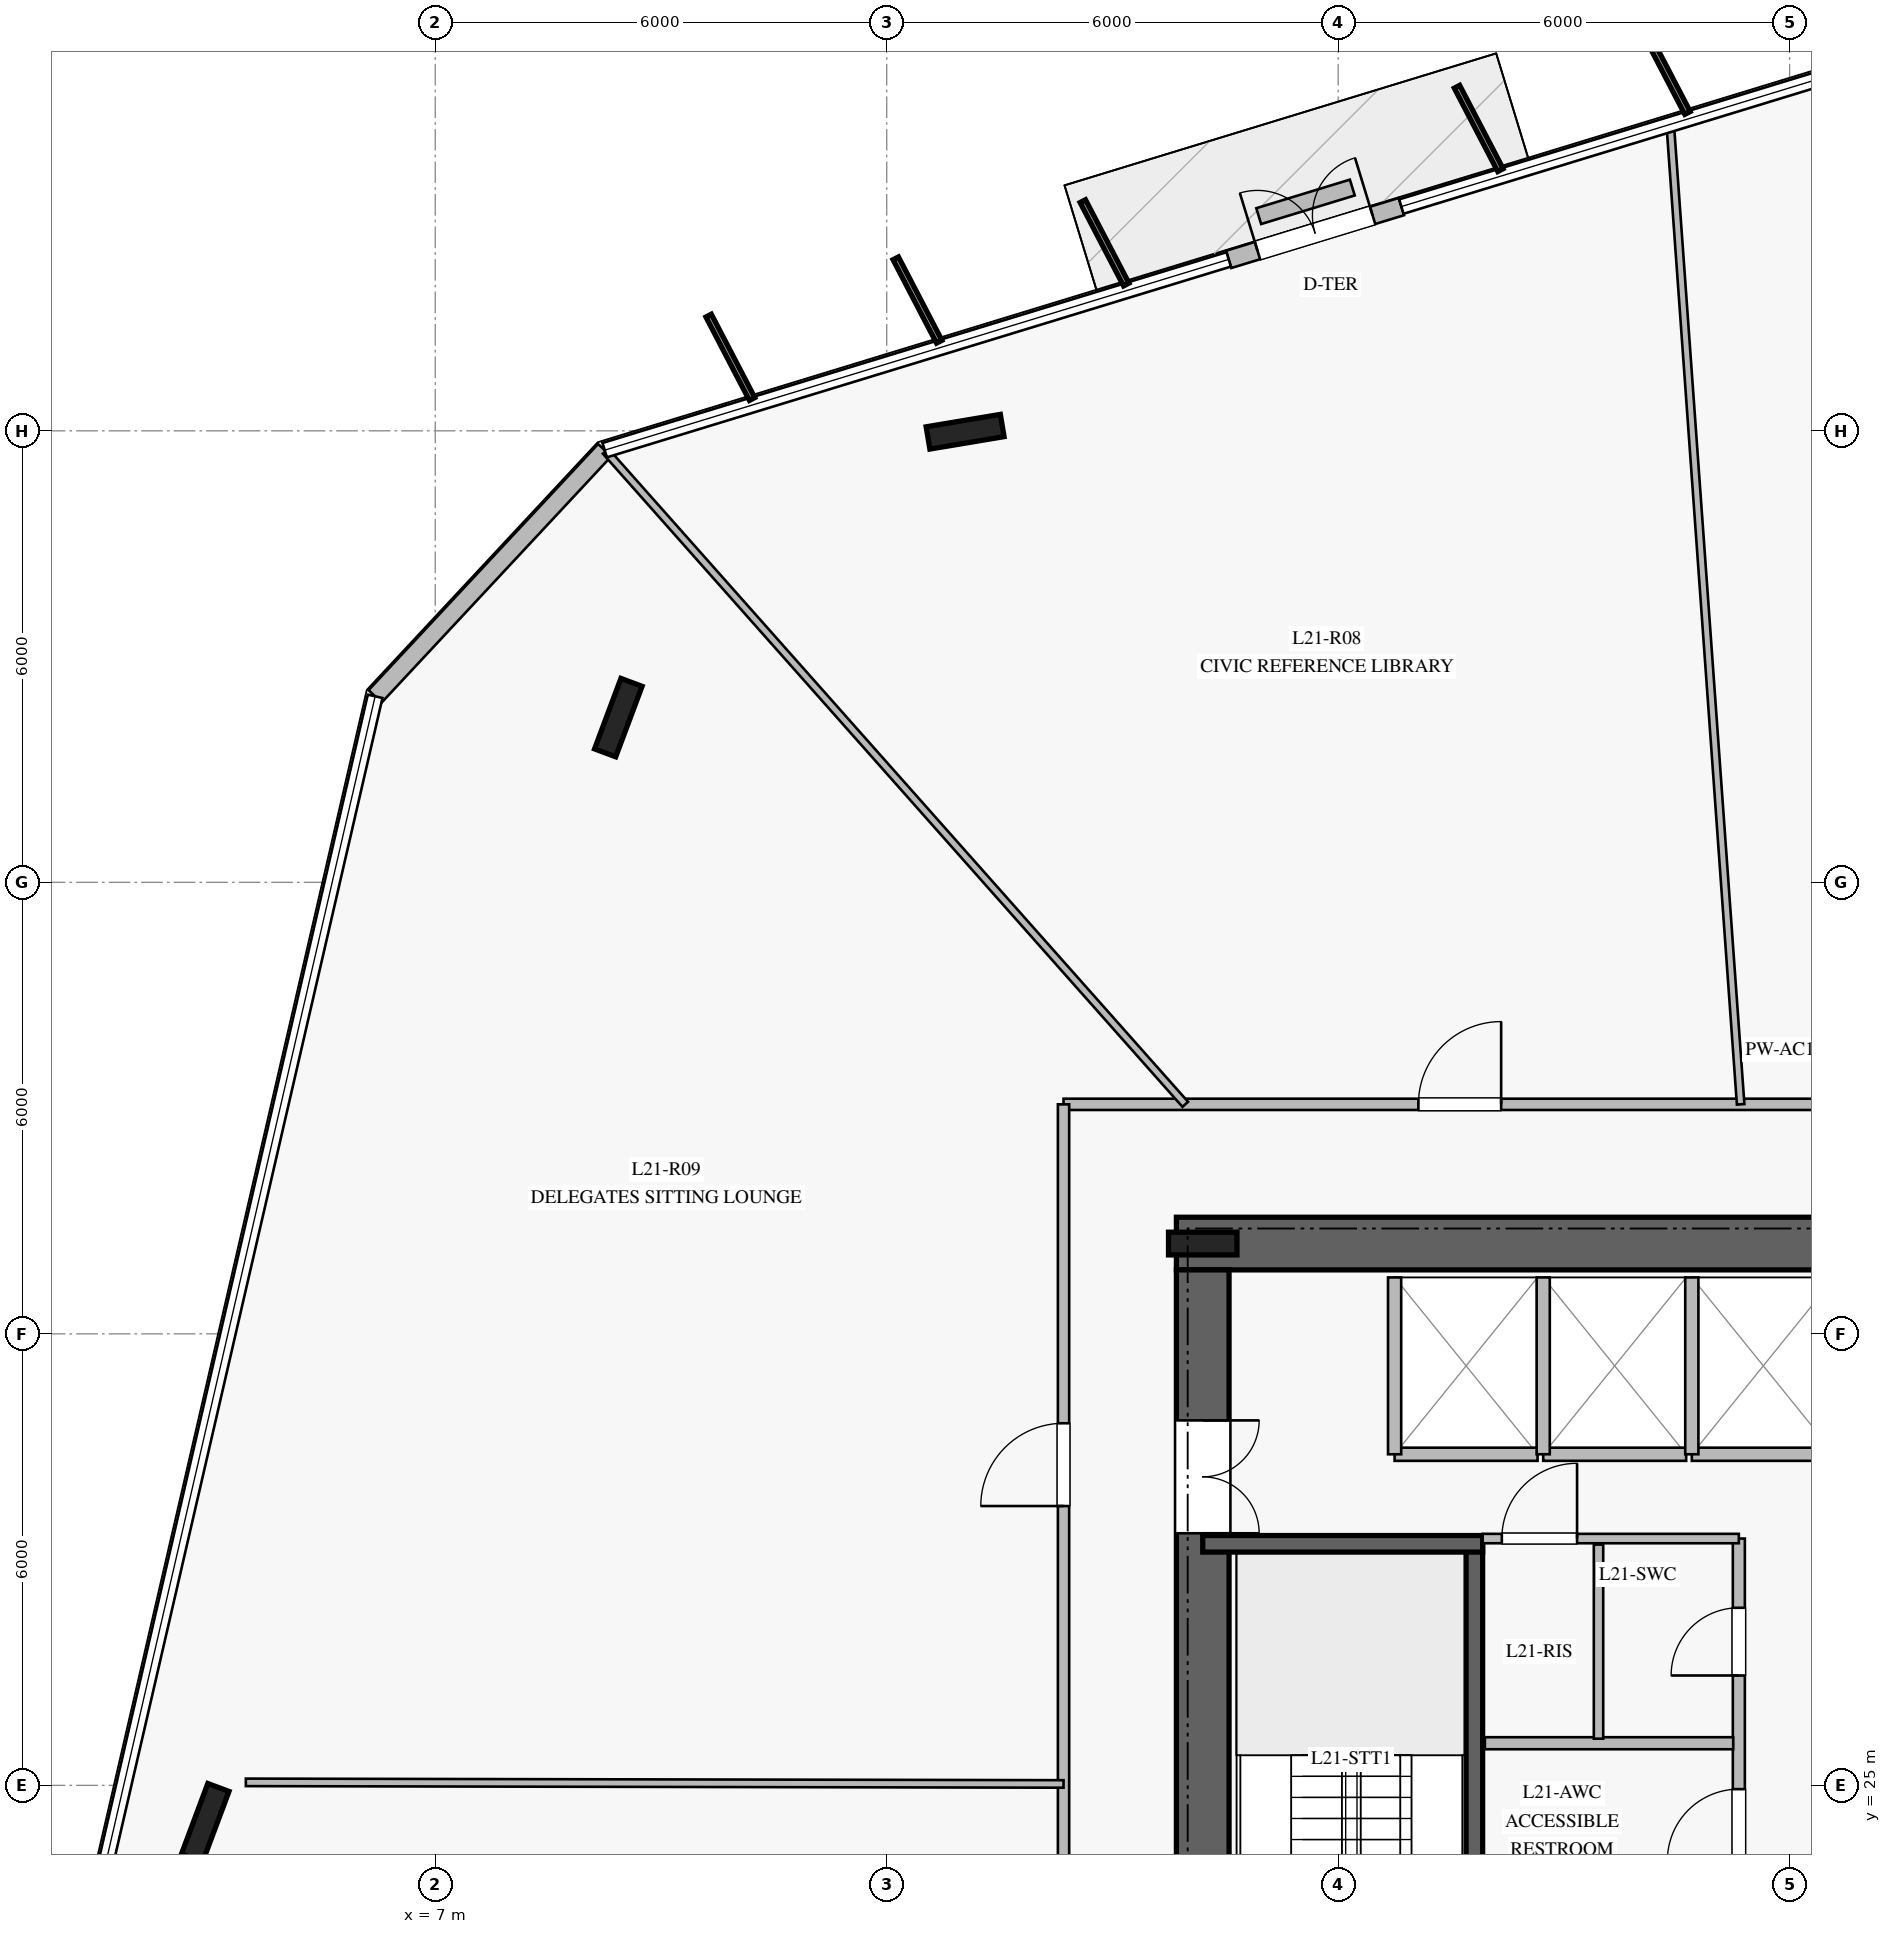
"""IFC4 building model, lengths in metres.
Left out: names, types, materials, properties, quantities, classifications, styles, units other than length and angle.
Written with IfcOpenShell. Run it as: python <this file> out.ifc"""

import sys

from ifc_helpers import new_model, si_unit, direction, frame, frame_2d, origin, origin_2d, place, context, subcontext, project, spatial, rectangle, i_section, extrude, element, fill, save


model = new_model("IFC4")
c1 = context("Model", 3, precision=1e-05, world=origin(), true_north=direction((0.0, 1.0)))
c2 = subcontext(c1, "Body", "Model", "MODEL_VIEW")
j1 = project(units=[si_unit("LENGTHUNIT", "METRE"), si_unit("PLANEANGLEUNIT", "RADIAN")], contexts=[c1])
p1 = place(None, origin())
s1 = spatial("IfcSite", under=j1, at=p1, CompositionType="ELEMENT")
p2 = place(p1, origin())
s2 = spatial("IfcBuilding", under=s1, at=p2, CompositionType="ELEMENT")
p3 = place(p2, frame((0.0, 0.0, 88.0)))
s3 = spatial("IfcBuildingStorey", under=s2, at=p3, CompositionType="ELEMENT", Elevation=88.0)
p4 = place(p3, frame((33.15, 32.2, 0.0), z_axis=(0.0, 0.0, 1.0), x_axis=(-1.0, 0.0, 0.0)))
e1 = element("IfcWall", 1, at=p4, inside=s3, PredefinedType="SHEAR", context=c2, shape_type="SweptSolid", body=[
    extrude(rectangle(XDim=16.3, YDim=0.7, at=frame_2d((8.15, 0.0))), origin(), (0.0, 0.0, 1.0), 3.7),
])
p5 = place(p4, frame((5.1, 0.0, 0.0)))
e2 = element("IfcOpeningElement", 2, at=p5, cuts=e1, PredefinedType="OPENING", context=c2, shape_type="SweptSolid", body=[
    extrude(rectangle(XDim=1.2, YDim=2.25, at=frame_2d((0.6, 1.125))), frame((0.0, 0.36, 0.0), z_axis=(0.0, -1.0, 0.0), x_axis=(1.0, 0.0, 0.0)), (0.0, 0.0, 1.0), 0.72),
])
p6 = place(p3, frame((17.2, 31.85, 0.0), z_axis=(0.0, 0.0, 1.0), x_axis=(0.0, -1.0, 0.0)))
e3 = element("IfcWall", 3, at=p6, inside=s3, PredefinedType="SHEAR", context=c2, shape_type="SweptSolid", body=[
    extrude(rectangle(XDim=13.7, YDim=0.7, at=frame_2d((6.85, 0.0))), origin(), (0.0, 0.0, 1.0), 3.7),
])
p7 = place(p6, frame((2.0, 0.0, 0.0)))
e4 = element("IfcOpeningElement", 4, at=p7, cuts=e3, PredefinedType="OPENING", context=c2, shape_type="SweptSolid", body=[
    extrude(rectangle(XDim=1.5, YDim=2.2, at=frame_2d((0.75, 1.1))), frame((0.0, 0.36, 0.0), z_axis=(0.0, -1.0, 0.0), x_axis=(1.0, 0.0, 0.0)), (0.0, 0.0, 1.0), 0.72),
])
p8 = place(p3, frame((17.2, 32.2, 0.0), z_axis=(0.0, 0.0, 1.0), x_axis=(1.0, 0.0, 0.0)))
e5 = element("IfcColumn", 5, at=p8, inside=s3, PredefinedType="COLUMN", context=c2, shape_type="SweptSolid", body=[
    extrude(i_section(OverallWidth=0.302, OverallDepth=0.91, WebThickness=0.021, FlangeThickness=0.04, at=origin_2d()), origin(), (0.0, 0.0, 1.0), 4.0),
])
p9 = place(p3, frame((20.81, 20.99, 0.0), z_axis=(0.0, 0.0, 1.0), x_axis=(0.0, 1.0, 0.0)))
e6 = element("IfcWall", 6, at=p9, inside=s3, PredefinedType="SOLIDWALL", context=c2, shape_type="SweptSolid", body=[
    extrude(rectangle(XDim=7.22, YDim=0.22, at=frame_2d((3.61, 0.0))), origin(), (0.0, 0.0, 1.0), 3.7),
])
p10 = place(p9, frame((0.18, 0.0, 0.0)))
e7 = element("IfcOpeningElement", 7, at=p10, cuts=e6, PredefinedType="OPENING", context=c2, shape_type="SweptSolid", body=[
    extrude(rectangle(XDim=1.15, YDim=2.2, at=frame_2d((0.575, 1.1))), frame((0.0, 0.12, 0.0), z_axis=(0.0, -1.0, 0.0), x_axis=(1.0, 0.0, 0.0)), (0.0, 0.0, 1.0), 0.24),
])
p11 = place(p3, frame((17.2, 28.21, 0.0), z_axis=(0.0, 0.0, 1.0), x_axis=(1.0, 0.0, 0.0)))
e8 = element("IfcWall", 8, at=p11, inside=s3, PredefinedType="SOLIDWALL", context=c2, shape_type="SweptSolid", body=[
    extrude(rectangle(XDim=3.72, YDim=0.22, at=frame_2d((1.86, 0.0))), origin(), (0.0, 0.0, 1.0), 3.7),
])
for number, where, z_axis, x_axis in (
    (9, (14.042, 42.988, 0.0), (0.0, 0.0, 1.0), (0.986, 0.165, 0.0)),
    (10, (9.433, 39.189, 0.0), (0.0, 0.0, 1.0), (0.35, 0.937, 0.0)),
    (11, (3.943, 24.504, 0.0), (0.0, 0.0, 1.0), (0.35, 0.937, 0.0)),
):
    element("IfcColumn", number, at=place(p3, frame(where, z_axis=z_axis, x_axis=x_axis)), inside=s3, PredefinedType="COLUMN", context=c2, shape_type="SweptSolid", body=[
        extrude(i_section(OverallWidth=0.3, OverallDepth=1.0, WebThickness=0.019, FlangeThickness=0.036, at=origin_2d()), origin(), (0.0, 0.0, 1.0), 4.0),
    ])
p12 = place(p3, frame((19.84, 45.98, 0.0), z_axis=(0.0, 0.0, 1.0), x_axis=(-0.956281264577, -0.292448530546, 0.0)))
e12 = element("IfcWall", 12, at=p12, inside=s3, PredefinedType="STANDARD", context=c2, shape_type="SweptSolid", body=[
    extrude(rectangle(XDim=2.4, YDim=0.24, at=frame_2d((1.2, 0.0))), origin(), (0.0, 0.0, 1.0), 3.7),
])
p13 = place(p12, frame((0.4, 0.0, 0.0)))
e13 = element("IfcOpeningElement", 13, at=p13, cuts=e12, PredefinedType="OPENING", context=c2, shape_type="SweptSolid", body=[
    extrude(rectangle(XDim=1.6, YDim=2.25, at=frame_2d((0.8, 1.125))), frame((0.0, 0.13, 0.0), z_axis=(0.0, -1.0, 0.0), x_axis=(1.0, 0.0, 0.0)), (0.0, 0.0, 1.0), 0.26),
])
p14 = place(p3, frame((9.252, 42.743, 0.0), z_axis=(0.0, 0.0, 1.0), x_axis=(-0.682090691133, -0.731267590606, 0.0)))
e14 = element("IfcWall", 14, at=p14, inside=s3, PredefinedType="STANDARD", context=c2, shape_type="SweptSolid", body=[
    extrude(rectangle(XDim=4.473, YDim=0.24, at=frame_2d((2.237, 0.0))), origin(), (0.0, 0.0, 1.0), 3.7),
])
p15 = place(p3, frame((19.188, 46.233, 0.0), z_axis=(0.0, 0.0, 1.0), x_axis=(-0.956393819486, -0.292080232212, 0.0)))
e15 = element("IfcWall", 15, at=p15, inside=s3, PredefinedType="USERDEFINED", context=c2, shape_type="SweptSolid", body=[
    extrude(rectangle(XDim=1.301, YDim=0.22, at=frame_2d((0.65, 0.0))), origin(), (0.0, 0.0, 1.0), 0.4),
])
p16 = place(p3, frame((24.325, 23.35, 0.0), z_axis=(0.0, 0.0, 1.0), x_axis=(0.0, 1.0, 0.0)))
e16 = element("IfcWall", 16, at=p16, inside=s3, PredefinedType="PLUMBINGWALL", context=c2, shape_type="SweptSolid", body=[
    extrude(rectangle(XDim=4.93, YDim=0.16, at=frame_2d((2.465, 0.0))), origin(), (0.0, 0.0, 1.0), 3.7),
])
p17 = place(p16, frame((0.65, 0.0, 0.0)))
e17 = element("IfcOpeningElement", 17, at=p17, cuts=e16, PredefinedType="OPENING", context=c2, shape_type="SweptSolid", body=[
    extrude(rectangle(XDim=0.95, YDim=2.1, at=frame_2d((0.475, 1.05))), frame((0.0, 0.09, 0.0), z_axis=(0.0, -1.0, 0.0), x_axis=(1.0, 0.0, 0.0)), (0.0, 0.0, 1.0), 0.18),
])
p18 = place(p16, frame((3.11, 0.0, 0.0)))
e18 = element("IfcOpeningElement", 18, at=p18, cuts=e16, PredefinedType="OPENING", context=c2, shape_type="SweptSolid", body=[
    extrude(rectangle(XDim=0.9, YDim=2.1, at=frame_2d((0.45, 1.05))), frame((0.0, 0.09, 0.0), z_axis=(0.0, -1.0, 0.0), x_axis=(1.0, 0.0, 0.0)), (0.0, 0.0, 1.0), 0.18),
])
p19 = place(p3, frame((20.92, 28.28, 0.0), z_axis=(0.0, 0.0, 1.0), x_axis=(1.0, 0.0, 0.0)))
e19 = element("IfcWall", 19, at=p19, inside=s3, PredefinedType="PARTITIONING", context=c2, shape_type="SweptSolid", body=[
    extrude(rectangle(XDim=3.405, YDim=0.125, at=frame_2d((1.703, 0.0))), origin(), (0.0, 0.0, 1.0), 3.7),
])
p20 = place(p19, frame((0.255, 0.0, 0.0)))
e20 = element("IfcOpeningElement", 20, at=p20, cuts=e19, PredefinedType="OPENING", context=c2, shape_type="SweptSolid", body=[
    extrude(rectangle(XDim=1.0, YDim=2.15, at=frame_2d((0.5, 1.075))), frame((0.0, 0.073, 0.0), z_axis=(0.0, -1.0, 0.0), x_axis=(1.0, 0.0, 0.0)), (0.0, 0.0, 1.0), 0.145),
])
p21 = place(p3, frame((20.95, 25.56, 0.0), z_axis=(0.0, 0.0, 1.0), x_axis=(1.0, 0.0, 0.0)))
e21 = element("IfcWall", 21, at=p21, inside=s3, PredefinedType="PLUMBINGWALL", context=c2, shape_type="SweptSolid", body=[
    extrude(rectangle(XDim=3.3, YDim=0.16, at=frame_2d((1.65, 0.0))), origin(), (0.0, 0.0, 1.0), 3.7),
])
p22 = place(p3, frame((22.46, 25.62, 0.0), z_axis=(0.0, 0.0, 1.0), x_axis=(0.0, 1.0, 0.0)))
e22 = element("IfcWall", 22, at=p22, inside=s3, PredefinedType="PARTITIONING", context=c2, shape_type="SweptSolid", body=[
    extrude(rectangle(XDim=2.58, YDim=0.125, at=frame_2d((1.29, 0.0))), origin(), (0.0, 0.0, 1.0), 3.7),
])
p23 = place(p3, frame((19.75, 29.4, 0.0), z_axis=(0.0, 0.0, 1.0), x_axis=(1.0, 0.0, 0.0)))
e23 = element("IfcWall", 23, at=p23, inside=s3, PredefinedType="PARTITIONING", context=c2, shape_type="SweptSolid", body=[
    extrude(rectangle(XDim=1.9, YDim=0.175, at=frame_2d((0.95, 0.0))), origin(), (0.0, 0.0, 1.0), 3.7),
])
p24 = place(p3, frame((19.75, 29.4, 0.0), z_axis=(0.0, 0.0, 1.0), x_axis=(0.0, 1.0, 0.0)))
e24 = element("IfcWall", 24, at=p24, inside=s3, PredefinedType="PARTITIONING", context=c2, shape_type="SweptSolid", body=[
    extrude(rectangle(XDim=2.35, YDim=0.175, at=frame_2d((1.175, 0.0))), origin(), (0.0, 0.0, 1.0), 3.7),
])
p25 = place(p3, frame((21.725, 29.4, 0.0), z_axis=(0.0, 0.0, 1.0), x_axis=(1.0, 0.0, 0.0)))
e25 = element("IfcWall", 25, at=p25, inside=s3, PredefinedType="PARTITIONING", context=c2, shape_type="SweptSolid", body=[
    extrude(rectangle(XDim=1.9, YDim=0.175, at=frame_2d((0.95, 0.0))), origin(), (0.0, 0.0, 1.0), 3.7),
])
p26 = place(p3, frame((21.725, 29.4, 0.0), z_axis=(0.0, 0.0, 1.0), x_axis=(0.0, 1.0, 0.0)))
e26 = element("IfcWall", 26, at=p26, inside=s3, PredefinedType="PARTITIONING", context=c2, shape_type="SweptSolid", body=[
    extrude(rectangle(XDim=2.35, YDim=0.175, at=frame_2d((1.175, 0.0))), origin(), (0.0, 0.0, 1.0), 3.7),
])
p27 = place(p3, frame((23.7, 29.4, 0.0), z_axis=(0.0, 0.0, 1.0), x_axis=(1.0, 0.0, 0.0)))
e27 = element("IfcWall", 27, at=p27, inside=s3, PredefinedType="PARTITIONING", context=c2, shape_type="SweptSolid", body=[
    extrude(rectangle(XDim=1.9, YDim=0.175, at=frame_2d((0.95, 0.0))), origin(), (0.0, 0.0, 1.0), 3.7),
])
p28 = place(p3, frame((23.7, 29.4, 0.0), z_axis=(0.0, 0.0, 1.0), x_axis=(0.0, 1.0, 0.0)))
e28 = element("IfcWall", 28, at=p28, inside=s3, PredefinedType="PARTITIONING", context=c2, shape_type="SweptSolid", body=[
    extrude(rectangle(XDim=2.35, YDim=0.175, at=frame_2d((1.175, 0.0))), origin(), (0.0, 0.0, 1.0), 3.7),
])
p29 = place(p3, frame((15.35, 34.05, 0.0), z_axis=(0.0, 0.0, 1.0), x_axis=(1.0, 0.0, 0.0)))
e29 = element("IfcWall", 29, at=p29, inside=s3, PredefinedType="PARTITIONING", context=c2, shape_type="SweptSolid", body=[
    extrude(rectangle(XDim=19.3, YDim=0.15, at=frame_2d((9.65, 0.0))), origin(), (0.0, 0.0, 1.0), 3.15),
])
p30 = place(p29, frame((13.036, 0.0, 0.0)))
e30 = element("IfcOpeningElement", 30, at=p30, cuts=e29, PredefinedType="OPENING", context=c2, shape_type="SweptSolid", body=[
    extrude(rectangle(XDim=1.1, YDim=2.2, at=frame_2d((0.55, 1.1))), frame((0.0, 0.085, 0.0), z_axis=(0.0, -1.0, 0.0), x_axis=(1.0, 0.0, 0.0)), (0.0, 0.0, 1.0), 0.17),
])
p31 = place(p29, frame((4.716, 0.0, 0.0)))
e31 = element("IfcOpeningElement", 31, at=p31, cuts=e29, PredefinedType="OPENING", context=c2, shape_type="SweptSolid", body=[
    extrude(rectangle(XDim=1.1, YDim=2.2, at=frame_2d((0.55, 1.1))), frame((0.0, 0.085, 0.0), z_axis=(0.0, -1.0, 0.0), x_axis=(1.0, 0.0, 0.0)), (0.0, 0.0, 1.0), 0.17),
])
p32 = place(p3, frame((15.35, 15.95, 0.0), z_axis=(0.0, 0.0, 1.0), x_axis=(0.0, 1.0, 0.0)))
e32 = element("IfcWall", 32, at=p32, inside=s3, PredefinedType="PARTITIONING", context=c2, shape_type="SweptSolid", body=[
    extrude(rectangle(XDim=18.1, YDim=0.15, at=frame_2d((9.05, 0.0))), origin(), (0.0, 0.0, 1.0), 3.15),
])
p33 = place(p32, frame((4.079, 0.0, 0.0)))
e33 = element("IfcOpeningElement", 33, at=p33, cuts=e32, PredefinedType="OPENING", context=c2, shape_type="SweptSolid", body=[
    extrude(rectangle(XDim=1.1, YDim=2.2, at=frame_2d((0.55, 1.1))), frame((0.0, 0.085, 0.0), z_axis=(0.0, -1.0, 0.0), x_axis=(1.0, 0.0, 0.0)), (0.0, 0.0, 1.0), 0.17),
])
p34 = place(p32, frame((12.762, 0.0, 0.0)))
e34 = element("IfcOpeningElement", 34, at=p34, cuts=e32, PredefinedType="OPENING", context=c2, shape_type="SweptSolid", body=[
    extrude(rectangle(XDim=1.1, YDim=2.2, at=frame_2d((0.55, 1.1))), frame((0.0, 0.085, 0.0), z_axis=(0.0, -1.0, 0.0), x_axis=(1.0, 0.0, 0.0)), (0.0, 0.0, 1.0), 0.17),
])
p35 = place(p3, frame((24.349, 34.05, 0.0), z_axis=(0.0, 0.0, 1.0), x_axis=(-0.071715443753, 0.997425132593, 0.0)))
e35 = element("IfcWall", 35, at=p35, inside=s3, PredefinedType="MOVABLE", context=c2, shape_type="SweptSolid", body=[
    extrude(rectangle(XDim=13.039, YDim=0.1, at=frame_2d((6.519, 0.0))), origin(), (0.0, 0.0, 1.0), 3.0),
])
p36 = place(p3, frame((16.968, 34.05, 0.0), z_axis=(0.0, 0.0, 1.0), x_axis=(-0.663809978561, 0.747901271801, 0.0)))
e36 = element("IfcWall", 36, at=p36, inside=s3, PredefinedType="MOVABLE", context=c2, shape_type="SweptSolid", body=[
    extrude(rectangle(XDim=11.604, YDim=0.1, at=frame_2d((5.802, 0.0))), origin(), (0.0, 0.0, 1.0), 3.0),
])
p37 = place(p3, frame((15.35, 25.019, 0.0), z_axis=(0.0, 0.0, 1.0), x_axis=(-0.999998133571, 0.001932059658, 0.0)))
e37 = element("IfcWall", 37, at=p37, inside=s3, PredefinedType="MOVABLE", context=c2, shape_type="SweptSolid", body=[
    extrude(rectangle(XDim=10.867, YDim=0.1, at=frame_2d((5.434, 0.0))), origin(), (0.0, 0.0, 1.0), 3.7),
])
p38 = place(p13, frame((1.6, 0.0, 0.0), z_axis=(0.0, 0.0, 1.0), x_axis=(-1.0, 0.0, 0.0)))
e38 = element("IfcDoor", 38, at=p38, inside=s3, OperationType="DOUBLE_DOOR_SINGLE_SWING", PredefinedType="DOOR", context=c2, shape_type="SweptSolid", body=[
    extrude(rectangle(XDim=1.6, YDim=2.25, at=frame_2d((0.8, 1.125))), frame((0.0, 0.025, 0.0), z_axis=(0.0, -1.0, 0.0), x_axis=(1.0, 0.0, 0.0)), (0.0, 0.0, 1.0), 0.05),
])
fill(e13, e38)
p39 = place(p7, origin())
e39 = element("IfcDoor", 39, at=p39, inside=s3, OperationType="DOUBLE_DOOR_SINGLE_SWING", PredefinedType="DOOR", context=c2, shape_type="SweptSolid", body=[
    extrude(rectangle(XDim=1.5, YDim=2.2, at=frame_2d((0.75, 1.1))), frame((0.0, 0.025, 0.0), z_axis=(0.0, -1.0, 0.0), x_axis=(1.0, 0.0, 0.0)), (0.0, 0.0, 1.0), 0.05),
])
fill(e4, e39)
p40 = place(p17, origin())
e40 = element("IfcDoor", 40, at=p40, inside=s3, OperationType="SINGLE_SWING_LEFT", PredefinedType="DOOR", context=c2, shape_type="SweptSolid", body=[
    extrude(rectangle(XDim=0.95, YDim=2.1, at=frame_2d((0.475, 1.05))), frame((0.0, 0.025, 0.0), z_axis=(0.0, -1.0, 0.0), x_axis=(1.0, 0.0, 0.0)), (0.0, 0.0, 1.0), 0.05),
])
fill(e17, e40)
p41 = place(p20, origin())
e41 = element("IfcDoor", 41, at=p41, inside=s3, OperationType="SINGLE_SWING_RIGHT", PredefinedType="DOOR", context=c2, shape_type="SweptSolid", body=[
    extrude(rectangle(XDim=1.0, YDim=2.15, at=frame_2d((0.5, 1.075))), frame((0.0, 0.025, 0.0), z_axis=(0.0, -1.0, 0.0), x_axis=(1.0, 0.0, 0.0)), (0.0, 0.0, 1.0), 0.05),
])
fill(e20, e41)
p42 = place(p18, origin())
e42 = element("IfcDoor", 42, at=p42, inside=s3, OperationType="SINGLE_SWING_LEFT", PredefinedType="DOOR", context=c2, shape_type="SweptSolid", body=[
    extrude(rectangle(XDim=0.9, YDim=2.1, at=frame_2d((0.45, 1.05))), frame((0.0, 0.025, 0.0), z_axis=(0.0, -1.0, 0.0), x_axis=(1.0, 0.0, 0.0)), (0.0, 0.0, 1.0), 0.05),
])
fill(e18, e42)
p43 = place(p31, origin())
e43 = element("IfcDoor", 43, at=p43, inside=s3, OperationType="SINGLE_SWING_RIGHT", PredefinedType="DOOR", context=c2, shape_type="SweptSolid", body=[
    extrude(rectangle(XDim=1.1, YDim=2.2, at=frame_2d((0.55, 1.1))), frame((0.0, 0.025, 0.0), z_axis=(0.0, -1.0, 0.0), x_axis=(1.0, 0.0, 0.0)), (0.0, 0.0, 1.0), 0.05),
])
fill(e31, e43)
p44 = place(p34, origin())
e44 = element("IfcDoor", 44, at=p44, inside=s3, OperationType="SINGLE_SWING_LEFT", PredefinedType="DOOR", context=c2, shape_type="SweptSolid", body=[
    extrude(rectangle(XDim=1.1, YDim=2.2, at=frame_2d((0.55, 1.1))), frame((0.0, 0.025, 0.0), z_axis=(0.0, -1.0, 0.0), x_axis=(1.0, 0.0, 0.0)), (0.0, 0.0, 1.0), 0.05),
])
fill(e34, e44)
save(model, sys.argv[1])
